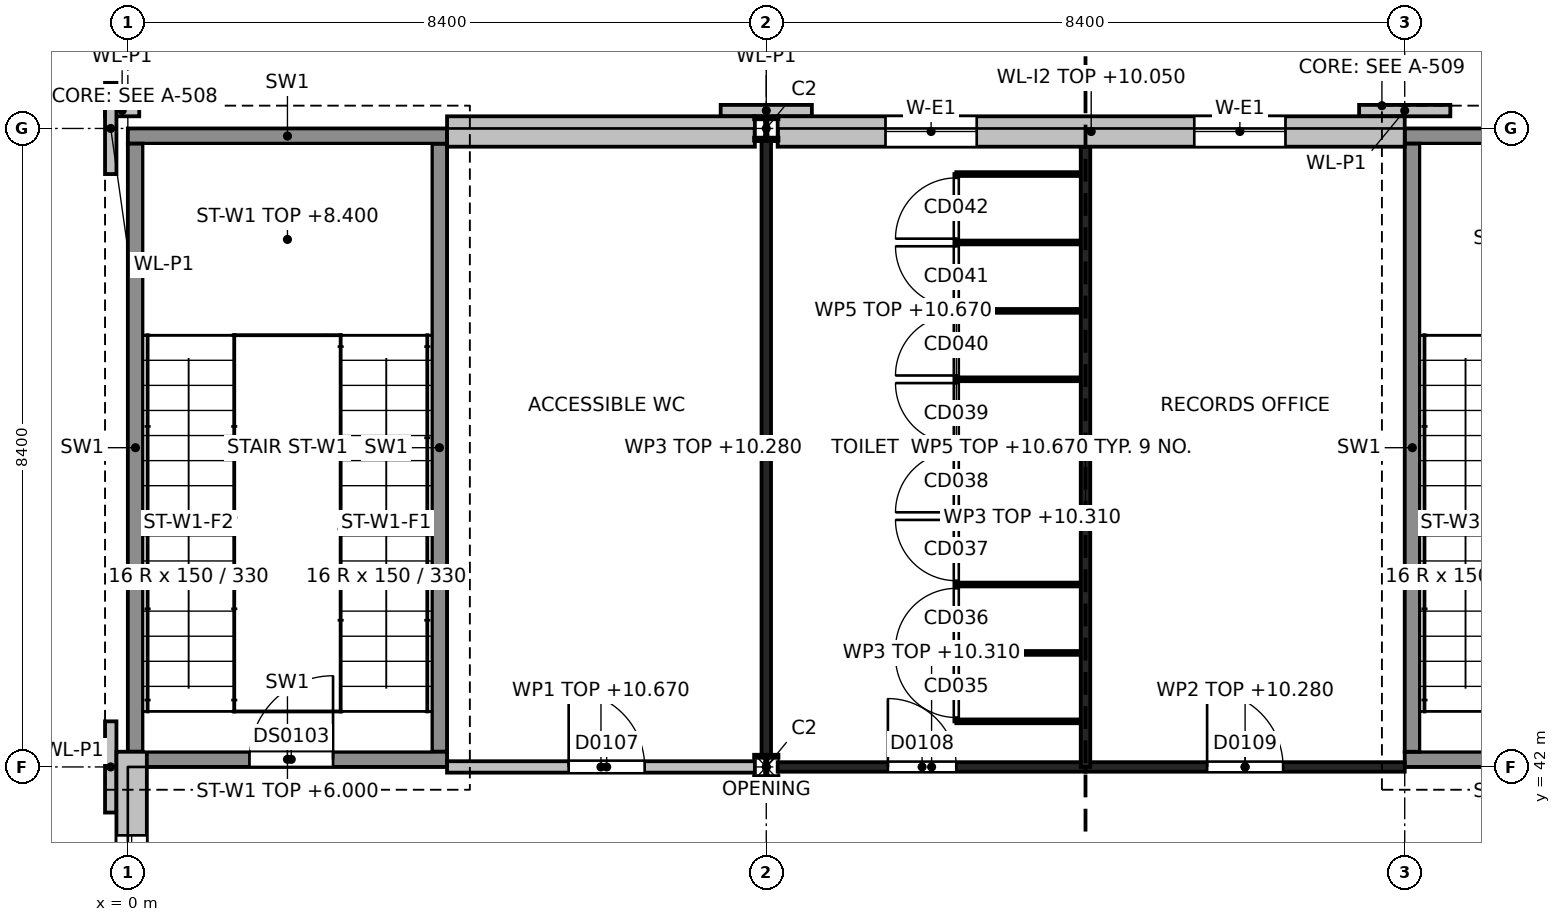
"""IFC4 building model, lengths in metres.
Left out: names, types, materials, properties, quantities, classifications, styles, units other than length and angle.
Written with IfcOpenShell. Run it as: python <this file> out.ifc"""

import sys

from ifc_helpers import new_model, si_unit, direction, frame, frame_2d, origin, origin_2d, place, context, subcontext, project, spatial, rectangle, i_section, extrude, element, fill, save


model = new_model("IFC4")
c1 = context("Model", 3, precision=1e-05, world=origin(), true_north=direction((0.0, 1.0)))
c2 = subcontext(c1, "Body", "Model", "MODEL_VIEW")
j1 = project(units=[si_unit("LENGTHUNIT", "METRE"), si_unit("PLANEANGLEUNIT", "RADIAN")], contexts=[c1])
p1 = place(None, origin())
s1 = spatial("IfcSite", under=j1, at=p1, CompositionType="ELEMENT")
p2 = place(p1, origin())
s2 = spatial("IfcBuilding", under=s1, at=p2, CompositionType="ELEMENT")
p3 = place(p2, frame((0.0, 0.0, 6.0)))
s3 = spatial("IfcBuildingStorey", under=s2, at=p3, CompositionType="ELEMENT", Elevation=6.0)
for number, where, z_axis, x_axis in (
    (1, (8.4, 42.0, 0.0), (0.0, 0.0, 1.0), (1.0, 0.0, 0.0)),
    (2, (8.4, 50.4, 0.0), (0.0, 0.0, 1.0), (1.0, 0.0, 0.0)),
):
    element("IfcColumn", number, at=place(p3, frame(where, z_axis=z_axis, x_axis=x_axis)), inside=s3, PredefinedType="COLUMN", context=c2, shape_type="SweptSolid", body=[
        extrude(i_section(OverallWidth=0.3, OverallDepth=0.3, WebThickness=0.011, FlangeThickness=0.019, at=origin_2d()), origin(), (0.0, 0.0, 1.0), 4.8),
    ])
p4 = place(p3, frame((0.0, 42.1, 0.0), z_axis=(0.0, 0.0, 1.0), x_axis=(1.0, 0.0, 0.0)))
e3 = element("IfcWall", 3, at=p4, inside=s3, PredefinedType="SHEAR", context=c2, shape_type="SweptSolid", body=[
    extrude(rectangle(XDim=4.2, YDim=0.2, at=frame_2d((2.1, 0.0))), origin(), (0.0, 0.0, 1.0), 4.8),
])
p5 = place(p4, frame((1.6, 0.0, 0.0)))
e4 = element("IfcOpeningElement", 4, at=p5, cuts=e3, PredefinedType="OPENING", context=c2, shape_type="SweptSolid", body=[
    extrude(rectangle(XDim=1.1, YDim=2.1, at=frame_2d((0.55, 1.05))), frame((0.0, 0.1, 0.0), z_axis=(0.0, -1.0, 0.0), x_axis=(1.0, 0.0, 0.0)), (0.0, 0.0, 1.0), 0.2),
])
p6 = place(p3, frame((0.0, 50.3, 0.0), z_axis=(0.0, 0.0, 1.0), x_axis=(1.0, 0.0, 0.0)))
e5 = element("IfcWall", 5, at=p6, inside=s3, PredefinedType="SHEAR", context=c2, shape_type="SweptSolid", body=[
    extrude(rectangle(XDim=4.2, YDim=0.2, at=frame_2d((2.1, 0.0))), origin(), (0.0, 0.0, 1.0), 4.8),
])
for number, where, z_axis, x_axis in (
    (6, (0.1, 42.2, 0.0), (0.0, 0.0, 1.0), (0.0, 1.0, 0.0)),
    (7, (4.1, 42.2, 0.0), (0.0, 0.0, 1.0), (0.0, 1.0, 0.0)),
):
    element("IfcWall", number, at=place(p3, frame(where, z_axis=z_axis, x_axis=x_axis)), inside=s3, PredefinedType="SHEAR", context=c2, shape_type="SweptSolid", body=[
        extrude(rectangle(XDim=8.0, YDim=0.2, at=frame_2d((4.0, 0.0))), origin(), (0.0, 0.0, 1.0), 4.8),
    ])
p7 = place(p3, frame((16.8, 42.1, 0.0), z_axis=(0.0, 0.0, 1.0), x_axis=(1.0, 0.0, 0.0)))
e8 = element("IfcWall", 8, at=p7, inside=s3, PredefinedType="SHEAR", context=c2, shape_type="SweptSolid", body=[
    extrude(rectangle(XDim=4.2, YDim=0.2, at=frame_2d((2.1, 0.0))), origin(), (0.0, 0.0, 1.0), 4.8),
])
p8 = place(p7, frame((1.6, 0.0, 0.0)))
e9 = element("IfcOpeningElement", 9, at=p8, cuts=e8, PredefinedType="OPENING", context=c2, shape_type="SweptSolid", body=[
    extrude(rectangle(XDim=1.1, YDim=2.1, at=frame_2d((0.55, 1.05))), frame((0.0, 0.1, 0.0), z_axis=(0.0, -1.0, 0.0), x_axis=(1.0, 0.0, 0.0)), (0.0, 0.0, 1.0), 0.2),
])
p9 = place(p3, frame((16.8, 50.3, 0.0), z_axis=(0.0, 0.0, 1.0), x_axis=(1.0, 0.0, 0.0)))
e10 = element("IfcWall", 10, at=p9, inside=s3, PredefinedType="SHEAR", context=c2, shape_type="SweptSolid", body=[
    extrude(rectangle(XDim=4.2, YDim=0.2, at=frame_2d((2.1, 0.0))), origin(), (0.0, 0.0, 1.0), 4.8),
])
p10 = place(p3, frame((16.9, 42.2, 0.0), z_axis=(0.0, 0.0, 1.0), x_axis=(0.0, 1.0, 0.0)))
e11 = element("IfcWall", 11, at=p10, inside=s3, PredefinedType="SHEAR", context=c2, shape_type="SweptSolid", body=[
    extrude(rectangle(XDim=8.0, YDim=0.2, at=frame_2d((4.0, 0.0))), origin(), (0.0, 0.0, 1.0), 4.8),
])
p11 = place(p3, frame((0.05, 33.75, 0.0), z_axis=(0.0, 0.0, 1.0), x_axis=(0.0, 1.0, 0.0)))
e12 = element("IfcWall", 12, at=p11, inside=s3, PredefinedType="SOLIDWALL", context=c2, shape_type="SweptSolid", body=[
    extrude(rectangle(XDim=8.45, YDim=0.4, at=frame_2d((4.225, 0.0))), origin(), (0.0, 0.0, 1.0), 4.05),
])
p12 = place(p11, frame((0.75, 0.0, 0.9)))
e13 = element("IfcOpeningElement", 13, at=p12, cuts=e12, PredefinedType="OPENING", context=c2, shape_type="SweptSolid", body=[
    extrude(rectangle(XDim=3.0, YDim=3.0, at=frame_2d((1.5, 1.5))), frame((0.0, 0.2, 0.0), z_axis=(0.0, -1.0, 0.0), x_axis=(1.0, 0.0, 0.0)), (0.0, 0.0, 1.0), 0.4),
])
p13 = place(p11, frame((4.35, 0.0, 0.9)))
e14 = element("IfcOpeningElement", 14, at=p13, cuts=e12, PredefinedType="OPENING", context=c2, shape_type="SweptSolid", body=[
    extrude(rectangle(XDim=3.0, YDim=3.0, at=frame_2d((1.5, 1.5))), frame((0.0, 0.2, 0.0), z_axis=(0.0, -1.0, 0.0), x_axis=(1.0, 0.0, 0.0)), (0.0, 0.0, 1.0), 0.4),
])
p14 = place(p3, frame((-0.225, 41.4, 0.0), z_axis=(0.0, 0.0, 1.0), x_axis=(0.0, 1.0, 0.0)))
e15 = element("IfcWall", 15, at=p14, inside=s3, PredefinedType="SOLIDWALL", context=c2, shape_type="SweptSolid", body=[
    extrude(rectangle(XDim=1.2, YDim=0.15, at=frame_2d((0.6, 0.0))), origin(), (0.0, 0.0, 1.0), 4.8),
])
p15 = place(p3, frame((-0.225, 49.8, 0.0), z_axis=(0.0, 0.0, 1.0), x_axis=(0.0, 1.0, 0.0)))
e16 = element("IfcWall", 16, at=p15, inside=s3, PredefinedType="SOLIDWALL", context=c2, shape_type="SweptSolid", body=[
    extrude(rectangle(XDim=1.2, YDim=0.15, at=frame_2d((0.6, 0.0))), origin(), (0.0, 0.0, 1.0), 4.8),
])
p16 = place(p3, frame((4.2, 50.36, 0.0), z_axis=(0.0, 0.0, 1.0), x_axis=(1.0, 0.0, 0.0)))
e17 = element("IfcWall", 17, at=p16, inside=s3, PredefinedType="SOLIDWALL", context=c2, shape_type="SweptSolid", body=[
    extrude(rectangle(XDim=4.05, YDim=0.4, at=frame_2d((2.025, 0.0))), origin(), (0.0, 0.0, 1.0), 4.05),
])
p17 = place(p3, frame((8.55, 50.36, 0.0), z_axis=(0.0, 0.0, 1.0), x_axis=(1.0, 0.0, 0.0)))
e18 = element("IfcWall", 18, at=p17, inside=s3, PredefinedType="SOLIDWALL", context=c2, shape_type="SweptSolid", body=[
    extrude(rectangle(XDim=8.25, YDim=0.4, at=frame_2d((4.125, 0.0))), origin(), (0.0, 0.0, 1.0), 4.05),
])
p18 = place(p17, frame((1.419, 0.0, 0.9)))
e19 = element("IfcOpeningElement", 19, at=p18, cuts=e18, PredefinedType="OPENING", context=c2, shape_type="SweptSolid", body=[
    extrude(rectangle(XDim=1.2, YDim=3.0, at=frame_2d((0.6, 1.5))), frame((0.0, 0.2, 0.0), z_axis=(0.0, -1.0, 0.0), x_axis=(1.0, 0.0, 0.0)), (0.0, 0.0, 1.0), 0.4),
])
p19 = place(p17, frame((5.481, 0.0, 0.9)))
e20 = element("IfcOpeningElement", 20, at=p19, cuts=e18, PredefinedType="OPENING", context=c2, shape_type="SweptSolid", body=[
    extrude(rectangle(XDim=1.2, YDim=3.0, at=frame_2d((0.6, 1.5))), frame((0.0, 0.2, 0.0), z_axis=(0.0, -1.0, 0.0), x_axis=(1.0, 0.0, 0.0)), (0.0, 0.0, 1.0), 0.4),
])
p20 = place(p3, frame((-0.3, 50.635, 0.0), z_axis=(0.0, 0.0, 1.0), x_axis=(1.0, 0.0, 0.0)))
e21 = element("IfcWall", 21, at=p20, inside=s3, PredefinedType="SOLIDWALL", context=c2, shape_type="SweptSolid", body=[
    extrude(rectangle(XDim=0.45, YDim=0.15, at=frame_2d((0.225, 0.0))), origin(), (0.0, 0.0, 1.0), 4.8),
])
for number, where, z_axis, x_axis in (
    (22, (7.8, 50.635, 0.0), (0.0, 0.0, 1.0), (1.0, 0.0, 0.0)),
    (23, (16.2, 50.635, 0.0), (0.0, 0.0, 1.0), (1.0, 0.0, 0.0)),
):
    element("IfcWall", number, at=place(p3, frame(where, z_axis=z_axis, x_axis=x_axis)), inside=s3, PredefinedType="SOLIDWALL", context=c2, shape_type="SweptSolid", body=[
        extrude(rectangle(XDim=1.2, YDim=0.15, at=frame_2d((0.6, 0.0))), origin(), (0.0, 0.0, 1.0), 4.8),
    ])
p21 = place(p3, frame((4.2, 42.0, 0.0), z_axis=(0.0, 0.0, 1.0), x_axis=(1.0, 0.0, 0.0)))
e24 = element("IfcWall", 24, at=p21, inside=s3, PredefinedType="PARTITIONING", context=c2, shape_type="SweptSolid", body=[
    extrude(rectangle(XDim=4.05, YDim=0.15, at=frame_2d((2.025, 0.0))), origin(), (0.0, 0.0, 1.0), 4.67),
])
p22 = place(p21, frame((1.6, 0.0, 0.0)))
e25 = element("IfcOpeningElement", 25, at=p22, cuts=e24, PredefinedType="OPENING", context=c2, shape_type="SweptSolid", body=[
    extrude(rectangle(XDim=1.0, YDim=2.1, at=frame_2d((0.5, 1.05))), frame((0.0, 0.075, 0.0), z_axis=(0.0, -1.0, 0.0), x_axis=(1.0, 0.0, 0.0)), (0.0, 0.0, 1.0), 0.15),
])
p23 = place(p3, frame((8.55, 42.0, 0.0), z_axis=(0.0, 0.0, 1.0), x_axis=(1.0, 0.0, 0.0)))
e26 = element("IfcWall", 26, at=p23, inside=s3, PredefinedType="PARTITIONING", context=c2, shape_type="SweptSolid", body=[
    extrude(rectangle(XDim=4.05, YDim=0.125, at=frame_2d((2.025, 0.0))), origin(), (0.0, 0.0, 1.0), 4.31),
])
p24 = place(p23, frame((1.45, 0.0, 0.0)))
e27 = element("IfcOpeningElement", 27, at=p24, cuts=e26, PredefinedType="OPENING", context=c2, shape_type="SweptSolid", body=[
    extrude(rectangle(XDim=0.9, YDim=2.1, at=frame_2d((0.45, 1.05))), frame((0.0, 0.062, 0.0), z_axis=(0.0, -1.0, 0.0), x_axis=(1.0, 0.0, 0.0)), (0.0, 0.0, 1.0), 0.125),
])
p25 = place(p3, frame((12.6, 42.0, 0.0), z_axis=(0.0, 0.0, 1.0), x_axis=(1.0, 0.0, 0.0)))
e28 = element("IfcWall", 28, at=p25, inside=s3, PredefinedType="PARTITIONING", context=c2, shape_type="SweptSolid", body=[
    extrude(rectangle(XDim=4.2, YDim=0.125, at=frame_2d((2.1, 0.0))), origin(), (0.0, 0.0, 1.0), 4.28),
])
p26 = place(p25, frame((1.6, 0.0, 0.0)))
e29 = element("IfcOpeningElement", 29, at=p26, cuts=e28, PredefinedType="OPENING", context=c2, shape_type="SweptSolid", body=[
    extrude(rectangle(XDim=1.0, YDim=2.2, at=frame_2d((0.5, 1.1))), frame((0.0, 0.062, 0.0), z_axis=(0.0, -1.0, 0.0), x_axis=(1.0, 0.0, 0.0)), (0.0, 0.0, 1.0), 0.125),
])
p27 = place(p3, frame((8.4, 42.15, 0.0), z_axis=(0.0, 0.0, 1.0), x_axis=(0.0, 1.0, 0.0)))
e30 = element("IfcWall", 30, at=p27, inside=s3, PredefinedType="PARTITIONING", context=c2, shape_type="SweptSolid", body=[
    extrude(rectangle(XDim=8.1, YDim=0.125, at=frame_2d((4.05, 0.0))), origin(), (0.0, 0.0, 1.0), 4.28),
])
p28 = place(p3, frame((12.6, 42.0, 0.0), z_axis=(0.0, 0.0, 1.0), x_axis=(0.0, 1.0, 0.0)))
e31 = element("IfcWall", 31, at=p28, inside=s3, PredefinedType="PARTITIONING", context=c2, shape_type="SweptSolid", body=[
    extrude(rectangle(XDim=8.159, YDim=0.125, at=frame_2d((4.08, 0.0))), origin(), (0.0, 0.0, 1.0), 4.31),
])
p29 = place(p3, frame((10.9, 42.6, 0.0), z_axis=(0.0, 0.0, 1.0), x_axis=(0.0, 1.0, 0.0)))
e32 = element("IfcWall", 32, at=p29, inside=s3, PredefinedType="PARTITIONING", context=c2, shape_type="SweptSolid", body=[
    extrude(rectangle(XDim=7.2, YDim=0.05, at=frame_2d((3.6, 0.0))), origin(), (0.0, 0.0, 1.0), 4.67),
])
p30 = place(p29, frame((0.05, 0.0, 0.0)))
e33 = element("IfcOpeningElement", 33, at=p30, cuts=e32, PredefinedType="OPENING", context=c2, shape_type="SweptSolid", body=[
    extrude(rectangle(XDim=0.8, YDim=2.0, at=frame_2d((0.4, 1.0))), frame((0.0, 0.025, 0.0), z_axis=(0.0, -1.0, 0.0), x_axis=(1.0, 0.0, 0.0)), (0.0, 0.0, 1.0), 0.05),
])
p31 = place(p29, frame((0.95, 0.0, 0.0)))
e34 = element("IfcOpeningElement", 34, at=p31, cuts=e32, PredefinedType="OPENING", context=c2, shape_type="SweptSolid", body=[
    extrude(rectangle(XDim=0.8, YDim=2.0, at=frame_2d((0.4, 1.0))), frame((0.0, 0.025, 0.0), z_axis=(0.0, -1.0, 0.0), x_axis=(1.0, 0.0, 0.0)), (0.0, 0.0, 1.0), 0.05),
])
p32 = place(p29, frame((1.85, 0.0, 0.0)))
e35 = element("IfcOpeningElement", 35, at=p32, cuts=e32, PredefinedType="OPENING", context=c2, shape_type="SweptSolid", body=[
    extrude(rectangle(XDim=0.8, YDim=2.0, at=frame_2d((0.4, 1.0))), frame((0.0, 0.025, 0.0), z_axis=(0.0, -1.0, 0.0), x_axis=(1.0, 0.0, 0.0)), (0.0, 0.0, 1.0), 0.05),
])
p33 = place(p29, frame((2.75, 0.0, 0.0)))
e36 = element("IfcOpeningElement", 36, at=p33, cuts=e32, PredefinedType="OPENING", context=c2, shape_type="SweptSolid", body=[
    extrude(rectangle(XDim=0.8, YDim=2.0, at=frame_2d((0.4, 1.0))), frame((0.0, 0.025, 0.0), z_axis=(0.0, -1.0, 0.0), x_axis=(1.0, 0.0, 0.0)), (0.0, 0.0, 1.0), 0.05),
])
p34 = place(p29, frame((3.65, 0.0, 0.0)))
e37 = element("IfcOpeningElement", 37, at=p34, cuts=e32, PredefinedType="OPENING", context=c2, shape_type="SweptSolid", body=[
    extrude(rectangle(XDim=0.8, YDim=2.0, at=frame_2d((0.4, 1.0))), frame((0.0, 0.025, 0.0), z_axis=(0.0, -1.0, 0.0), x_axis=(1.0, 0.0, 0.0)), (0.0, 0.0, 1.0), 0.05),
])
p35 = place(p29, frame((4.55, 0.0, 0.0)))
e38 = element("IfcOpeningElement", 38, at=p35, cuts=e32, PredefinedType="OPENING", context=c2, shape_type="SweptSolid", body=[
    extrude(rectangle(XDim=0.8, YDim=2.0, at=frame_2d((0.4, 1.0))), frame((0.0, 0.025, 0.0), z_axis=(0.0, -1.0, 0.0), x_axis=(1.0, 0.0, 0.0)), (0.0, 0.0, 1.0), 0.05),
])
p36 = place(p29, frame((5.45, 0.0, 0.0)))
e39 = element("IfcOpeningElement", 39, at=p36, cuts=e32, PredefinedType="OPENING", context=c2, shape_type="SweptSolid", body=[
    extrude(rectangle(XDim=0.8, YDim=2.0, at=frame_2d((0.4, 1.0))), frame((0.0, 0.025, 0.0), z_axis=(0.0, -1.0, 0.0), x_axis=(1.0, 0.0, 0.0)), (0.0, 0.0, 1.0), 0.05),
])
p37 = place(p29, frame((6.35, 0.0, 0.0)))
e40 = element("IfcOpeningElement", 40, at=p37, cuts=e32, PredefinedType="OPENING", context=c2, shape_type="SweptSolid", body=[
    extrude(rectangle(XDim=0.8, YDim=2.0, at=frame_2d((0.4, 1.0))), frame((0.0, 0.025, 0.0), z_axis=(0.0, -1.0, 0.0), x_axis=(1.0, 0.0, 0.0)), (0.0, 0.0, 1.0), 0.05),
])
for number, where, z_axis, x_axis in (
    (41, (12.6, 42.6, 0.0), (0.0, 0.0, 1.0), (-1.0, 0.0, 0.0)),
    (42, (12.6, 43.5, 0.0), (0.0, 0.0, 1.0), (-1.0, 0.0, 0.0)),
    (43, (12.6, 44.4, 0.0), (0.0, 0.0, 1.0), (-1.0, 0.0, 0.0)),
    (44, (12.6, 45.3, 0.0), (0.0, 0.0, 1.0), (-1.0, 0.0, 0.0)),
    (45, (12.6, 46.2, 0.0), (0.0, 0.0, 1.0), (-1.0, 0.0, 0.0)),
    (46, (12.6, 47.1, 0.0), (0.0, 0.0, 1.0), (-1.0, 0.0, 0.0)),
    (47, (12.6, 48.0, 0.0), (0.0, 0.0, 1.0), (-1.0, 0.0, 0.0)),
    (48, (12.6, 48.9, 0.0), (0.0, 0.0, 1.0), (-1.0, 0.0, 0.0)),
    (49, (12.6, 49.8, 0.0), (0.0, 0.0, 1.0), (-1.0, 0.0, 0.0)),
):
    element("IfcWall", number, at=place(p3, frame(where, z_axis=z_axis, x_axis=x_axis)), inside=s3, PredefinedType="PARTITIONING", context=c2, shape_type="SweptSolid", body=[
        extrude(rectangle(XDim=1.7, YDim=0.05, at=frame_2d((0.85, 0.0))), origin(), (0.0, 0.0, 1.0), 4.67),
    ])
p38 = place(p13, origin())
e50 = element("IfcWindow", 50, at=p38, inside=s3, PartitioningType="SINGLE_PANEL", PredefinedType="WINDOW", context=c2, shape_type="SweptSolid", body=[
    extrude(rectangle(XDim=3.0, YDim=3.0, at=frame_2d((1.5, 1.5))), frame((0.0, 0.03, 0.0), z_axis=(0.0, -1.0, 0.0), x_axis=(1.0, 0.0, 0.0)), (0.0, 0.0, 1.0), 0.06),
])
fill(e14, e50)
p39 = place(p18, origin())
e51 = element("IfcWindow", 51, at=p39, inside=s3, PartitioningType="SINGLE_PANEL", PredefinedType="WINDOW", context=c2, shape_type="SweptSolid", body=[
    extrude(rectangle(XDim=1.2, YDim=3.0, at=frame_2d((0.6, 1.5))), frame((0.0, 0.03, 0.0), z_axis=(0.0, -1.0, 0.0), x_axis=(1.0, 0.0, 0.0)), (0.0, 0.0, 1.0), 0.06),
])
fill(e19, e51)
p40 = place(p19, origin())
e52 = element("IfcWindow", 52, at=p40, inside=s3, PartitioningType="SINGLE_PANEL", PredefinedType="WINDOW", context=c2, shape_type="SweptSolid", body=[
    extrude(rectangle(XDim=1.2, YDim=3.0, at=frame_2d((0.6, 1.5))), frame((0.0, 0.03, 0.0), z_axis=(0.0, -1.0, 0.0), x_axis=(1.0, 0.0, 0.0)), (0.0, 0.0, 1.0), 0.06),
])
fill(e20, e52)
p41 = place(p22, origin())
e53 = element("IfcDoor", 53, at=p41, inside=s3, OperationType="SINGLE_SWING_LEFT", PredefinedType="DOOR", context=c2, shape_type="SweptSolid", body=[
    extrude(rectangle(XDim=1.0, YDim=2.1, at=frame_2d((0.5, 1.05))), frame((0.0, 0.025, 0.0), z_axis=(0.0, -1.0, 0.0), x_axis=(1.0, 0.0, 0.0)), (0.0, 0.0, 1.0), 0.05),
])
fill(e25, e53)
p42 = place(p24, origin())
e54 = element("IfcDoor", 54, at=p42, inside=s3, OperationType="SINGLE_SWING_LEFT", PredefinedType="DOOR", context=c2, shape_type="SweptSolid", body=[
    extrude(rectangle(XDim=0.9, YDim=2.1, at=frame_2d((0.45, 1.05))), frame((0.0, 0.025, 0.0), z_axis=(0.0, -1.0, 0.0), x_axis=(1.0, 0.0, 0.0)), (0.0, 0.0, 1.0), 0.05),
])
fill(e27, e54)
p43 = place(p26, origin())
e55 = element("IfcDoor", 55, at=p43, inside=s3, OperationType="SINGLE_SWING_LEFT", PredefinedType="DOOR", context=c2, shape_type="SweptSolid", body=[
    extrude(rectangle(XDim=1.0, YDim=2.2, at=frame_2d((0.5, 1.1))), frame((0.0, 0.025, 0.0), z_axis=(0.0, -1.0, 0.0), x_axis=(1.0, 0.0, 0.0)), (0.0, 0.0, 1.0), 0.05),
])
fill(e29, e55)
p44 = place(p5, origin())
e56 = element("IfcDoor", 56, at=p44, inside=s3, OperationType="SINGLE_SWING_RIGHT", PredefinedType="DOOR", context=c2, shape_type="SweptSolid", body=[
    extrude(rectangle(XDim=1.1, YDim=2.1, at=frame_2d((0.55, 1.05))), frame((0.0, 0.025, 0.0), z_axis=(0.0, -1.0, 0.0), x_axis=(1.0, 0.0, 0.0)), (0.0, 0.0, 1.0), 0.05),
])
fill(e4, e56)
p45 = place(p30, origin())
e57 = element("IfcDoor", 57, at=p45, inside=s3, OperationType="SINGLE_SWING_RIGHT", PredefinedType="DOOR", context=c2, shape_type="SweptSolid", body=[
    extrude(rectangle(XDim=0.8, YDim=2.0, at=frame_2d((0.4, 1.0))), frame((0.0, 0.025, 0.0), z_axis=(0.0, -1.0, 0.0), x_axis=(1.0, 0.0, 0.0)), (0.0, 0.0, 1.0), 0.05),
])
fill(e33, e57)
p46 = place(p31, origin())
e58 = element("IfcDoor", 58, at=p46, inside=s3, OperationType="SINGLE_SWING_LEFT", PredefinedType="DOOR", context=c2, shape_type="SweptSolid", body=[
    extrude(rectangle(XDim=0.8, YDim=2.0, at=frame_2d((0.4, 1.0))), frame((0.0, 0.025, 0.0), z_axis=(0.0, -1.0, 0.0), x_axis=(1.0, 0.0, 0.0)), (0.0, 0.0, 1.0), 0.05),
])
fill(e34, e58)
p47 = place(p32, origin())
e59 = element("IfcDoor", 59, at=p47, inside=s3, OperationType="SINGLE_SWING_RIGHT", PredefinedType="DOOR", context=c2, shape_type="SweptSolid", body=[
    extrude(rectangle(XDim=0.8, YDim=2.0, at=frame_2d((0.4, 1.0))), frame((0.0, 0.025, 0.0), z_axis=(0.0, -1.0, 0.0), x_axis=(1.0, 0.0, 0.0)), (0.0, 0.0, 1.0), 0.05),
])
fill(e35, e59)
p48 = place(p33, origin())
e60 = element("IfcDoor", 60, at=p48, inside=s3, OperationType="SINGLE_SWING_LEFT", PredefinedType="DOOR", context=c2, shape_type="SweptSolid", body=[
    extrude(rectangle(XDim=0.8, YDim=2.0, at=frame_2d((0.4, 1.0))), frame((0.0, 0.025, 0.0), z_axis=(0.0, -1.0, 0.0), x_axis=(1.0, 0.0, 0.0)), (0.0, 0.0, 1.0), 0.05),
])
fill(e36, e60)
p49 = place(p34, origin())
e61 = element("IfcDoor", 61, at=p49, inside=s3, OperationType="SINGLE_SWING_RIGHT", PredefinedType="DOOR", context=c2, shape_type="SweptSolid", body=[
    extrude(rectangle(XDim=0.8, YDim=2.0, at=frame_2d((0.4, 1.0))), frame((0.0, 0.025, 0.0), z_axis=(0.0, -1.0, 0.0), x_axis=(1.0, 0.0, 0.0)), (0.0, 0.0, 1.0), 0.05),
])
fill(e37, e61)
p50 = place(p35, origin())
e62 = element("IfcDoor", 62, at=p50, inside=s3, OperationType="SINGLE_SWING_LEFT", PredefinedType="DOOR", context=c2, shape_type="SweptSolid", body=[
    extrude(rectangle(XDim=0.8, YDim=2.0, at=frame_2d((0.4, 1.0))), frame((0.0, 0.025, 0.0), z_axis=(0.0, -1.0, 0.0), x_axis=(1.0, 0.0, 0.0)), (0.0, 0.0, 1.0), 0.05),
])
fill(e38, e62)
p51 = place(p36, origin())
e63 = element("IfcDoor", 63, at=p51, inside=s3, OperationType="SINGLE_SWING_RIGHT", PredefinedType="DOOR", context=c2, shape_type="SweptSolid", body=[
    extrude(rectangle(XDim=0.8, YDim=2.0, at=frame_2d((0.4, 1.0))), frame((0.0, 0.025, 0.0), z_axis=(0.0, -1.0, 0.0), x_axis=(1.0, 0.0, 0.0)), (0.0, 0.0, 1.0), 0.05),
])
fill(e39, e63)
p52 = place(p37, origin())
e64 = element("IfcDoor", 64, at=p52, inside=s3, OperationType="SINGLE_SWING_LEFT", PredefinedType="DOOR", context=c2, shape_type="SweptSolid", body=[
    extrude(rectangle(XDim=0.8, YDim=2.0, at=frame_2d((0.4, 1.0))), frame((0.0, 0.025, 0.0), z_axis=(0.0, -1.0, 0.0), x_axis=(1.0, 0.0, 0.0)), (0.0, 0.0, 1.0), 0.05),
])
fill(e40, e64)
save(model, sys.argv[1])
